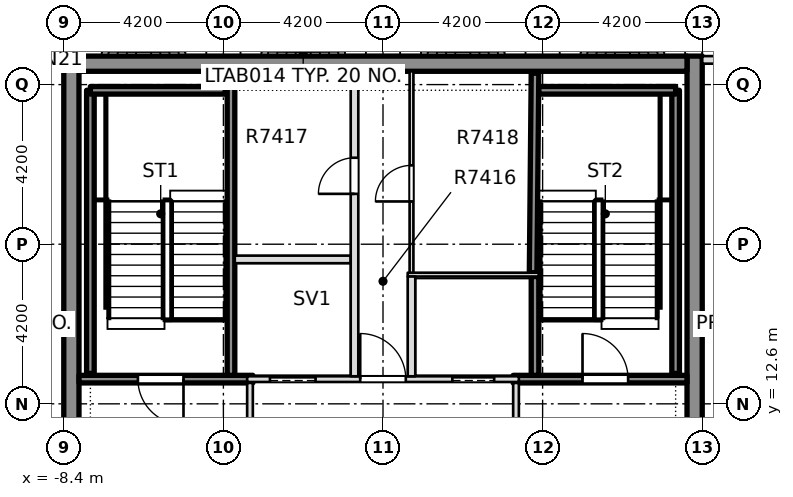
"""IFC4 building model, lengths in metres.
Left out: names, types, materials, properties, quantities, classifications, styles, units other than length and angle.
Written with IfcOpenShell. Run it as: python <this file> out.ifc"""

import sys

from ifc_helpers import new_model, si_unit, direction, frame, frame_2d, origin, place, context, subcontext, project, spatial, rectangle, extrude, element, fill, save


model = new_model("IFC4")
c1 = context("Model", 3, precision=1e-05, world=origin(), true_north=direction((0.0, 1.0)))
c2 = subcontext(c1, "Body", "Model", "MODEL_VIEW")
j1 = project(units=[si_unit("LENGTHUNIT", "METRE"), si_unit("PLANEANGLEUNIT", "RADIAN")], contexts=[c1])
p1 = place(None, origin())
s1 = spatial("IfcSite", under=j1, at=p1, CompositionType="ELEMENT")
p2 = place(p1, origin())
s2 = spatial("IfcBuilding", under=s1, at=p2, CompositionType="ELEMENT")
p3 = place(p2, frame((0.0, 0.0, 284.85)))
s3 = spatial("IfcBuildingStorey", under=s2, at=p3, CompositionType="ELEMENT", Elevation=284.85)
p4 = place(p3, frame((8.2, 4.2, -0.5), z_axis=(0.0, 0.0, 1.0), x_axis=(0.0, 1.0, 0.0)))
e1 = element("IfcWall", 1, at=p4, inside=s3, PredefinedType="SHEAR", context=c2, shape_type="SweptSolid", body=[
    extrude(rectangle(XDim=17.55, YDim=0.4, at=frame_2d((8.775, 0.0))), origin(), (0.0, 0.0, 1.0), 4.5),
])
p5 = place(p4, frame((6.7, 0.0, 0.5)))
e2 = element("IfcOpeningElement", 2, at=p5, cuts=e1, PredefinedType="OPENING", context=c2, shape_type="SweptSolid", body=[
    extrude(rectangle(XDim=1.2, YDim=2.1, at=frame_2d((0.6, 1.05))), frame((0.0, 0.21, 0.0), z_axis=(0.0, -1.0, 0.0), x_axis=(1.0, 0.0, 0.0)), (0.0, 0.0, 1.0), 0.42),
])
p6 = place(p3, frame((-8.2, 4.2, -0.5), z_axis=(0.0, 0.0, 1.0), x_axis=(0.0, 1.0, 0.0)))
e3 = element("IfcWall", 3, at=p6, inside=s3, PredefinedType="SHEAR", context=c2, shape_type="SweptSolid", body=[
    extrude(rectangle(XDim=17.55, YDim=0.4, at=frame_2d((8.775, 0.0))), origin(), (0.0, 0.0, 1.0), 4.5),
])
p7 = place(p6, frame((6.7, 0.0, 0.5)))
e4 = element("IfcOpeningElement", 4, at=p7, cuts=e3, PredefinedType="OPENING", context=c2, shape_type="SweptSolid", body=[
    extrude(rectangle(XDim=1.2, YDim=2.1, at=frame_2d((0.6, 1.05))), frame((0.0, 0.21, 0.0), z_axis=(0.0, -1.0, 0.0), x_axis=(1.0, 0.0, 0.0)), (0.0, 0.0, 1.0), 0.42),
])
p8 = place(p3, frame((-8.0, 21.55, -0.5), z_axis=(0.0, 0.0, 1.0), x_axis=(1.0, 0.0, 0.0)))
e5 = element("IfcWall", 5, at=p8, inside=s3, PredefinedType="SHEAR", context=c2, shape_type="SweptSolid", body=[
    extrude(rectangle(XDim=16.0, YDim=0.4, at=frame_2d((8.0, 0.0))), origin(), (0.0, 0.0, 1.0), 4.5),
])
for number, where, z_axis, x_axis in (
    (6, (9.6, 21.65, 0.0), (0.0, 0.0, 1.0), (-1.0, 0.0, 0.0)),
    (7, (-8.4, 21.65, 0.0), (0.0, 0.0, 1.0), (-1.0, 0.0, 0.0)),
):
    element("IfcWall", number, at=place(p3, frame(where, z_axis=z_axis, x_axis=x_axis)), inside=s3, PredefinedType="STANDARD", context=c2, shape_type="SweptSolid", body=[
        extrude(rectangle(XDim=1.2, YDim=0.2, at=frame_2d((0.6, 0.0))), origin(), (0.0, 0.0, 1.0), 4.0),
    ])
p9 = place(p3, frame((-7.999, 13.25, 0.0), z_axis=(0.0, 0.0, 1.0), x_axis=(1.0, 0.0, 0.0)))
e8 = element("IfcWall", 8, at=p9, inside=s3, PredefinedType="SOLIDWALL", context=c2, shape_type="SweptSolid", body=[
    extrude(rectangle(XDim=4.574, YDim=0.2, at=frame_2d((2.287, 0.0))), origin(), (0.0, 0.0, 1.0), 4.0),
])
p10 = place(p9, frame((1.549, 0.0, 0.0)))
e9 = element("IfcOpeningElement", 9, at=p10, cuts=e8, PredefinedType="OPENING", context=c2, shape_type="SweptSolid", body=[
    extrude(rectangle(XDim=1.2, YDim=2.1, at=frame_2d((0.6, 1.05))), frame((0.0, 0.11, 0.0), z_axis=(0.0, -1.0, 0.0), x_axis=(1.0, 0.0, 0.0)), (0.0, 0.0, 1.0), 0.22),
])
p11 = place(p3, frame((-3.575, 13.25, 0.0), z_axis=(0.0, 0.0, 1.0), x_axis=(1.0, 0.0, 0.0)))
e10 = element("IfcWall", 10, at=p11, inside=s3, PredefinedType="PARTITIONING", context=c2, shape_type="SweptSolid", body=[
    extrude(rectangle(XDim=7.15, YDim=0.15, at=frame_2d((3.575, 0.0))), origin(), (0.0, 0.0, 1.0), 4.0),
])
p12 = place(p11, frame((0.6, 0.0, 0.0)))
e11 = element("IfcOpeningElement", 11, at=p12, cuts=e10, PredefinedType="OPENING", context=c2, shape_type="SweptSolid", body=[
    extrude(rectangle(XDim=1.2, YDim=2.1, at=frame_2d((0.6, 1.05))), frame((0.0, 0.085, 0.0), z_axis=(0.0, -1.0, 0.0), x_axis=(1.0, 0.0, 0.0)), (0.0, 0.0, 1.0), 0.17),
])
p13 = place(p11, frame((5.4, 0.0, 0.0)))
e12 = element("IfcOpeningElement", 12, at=p13, cuts=e10, PredefinedType="OPENING", context=c2, shape_type="SweptSolid", body=[
    extrude(rectangle(XDim=1.1, YDim=2.1, at=frame_2d((0.55, 1.05))), frame((0.0, 0.085, 0.0), z_axis=(0.0, -1.0, 0.0), x_axis=(1.0, 0.0, 0.0)), (0.0, 0.0, 1.0), 0.17),
])
p14 = place(p11, frame((2.975, 0.0, 0.0)))
e13 = element("IfcOpeningElement", 13, at=p14, cuts=e10, PredefinedType="OPENING", context=c2, shape_type="SweptSolid", body=[
    extrude(rectangle(XDim=1.2, YDim=2.1, at=frame_2d((0.6, 1.05))), frame((0.0, 0.085, 0.0), z_axis=(0.0, -1.0, 0.0), x_axis=(1.0, 0.0, 0.0)), (0.0, 0.0, 1.0), 0.17),
])
p15 = place(p3, frame((3.425, 13.25, 0.0), z_axis=(0.0, 0.0, 1.0), x_axis=(1.0, 0.0, 0.0)))
e14 = element("IfcWall", 14, at=p15, inside=s3, PredefinedType="SOLIDWALL", context=c2, shape_type="SweptSolid", body=[
    extrude(rectangle(XDim=4.574, YDim=0.2, at=frame_2d((2.287, 0.0))), origin(), (0.0, 0.0, 1.0), 4.0),
])
p16 = place(p15, frame((1.825, 0.0, 0.0)))
e15 = element("IfcOpeningElement", 15, at=p16, cuts=e14, PredefinedType="OPENING", context=c2, shape_type="SweptSolid", body=[
    extrude(rectangle(XDim=1.2, YDim=2.1, at=frame_2d((0.6, 1.05))), frame((0.0, 0.11, 0.0), z_axis=(0.0, -1.0, 0.0), x_axis=(1.0, 0.0, 0.0)), (0.0, 0.0, 1.0), 0.22),
])
p17 = place(p3, frame((0.65, 16.0, 0.0), z_axis=(0.0, 0.0, 1.0), x_axis=(1.0, 0.0, 0.0)))
e16 = element("IfcWall", 16, at=p17, inside=s3, PredefinedType="PARTITIONING", context=c2, shape_type="SweptSolid", body=[
    extrude(rectangle(XDim=3.45, YDim=0.1, at=frame_2d((1.725, 0.0))), origin(), (0.0, 0.0, 1.0), 4.0),
])
p18 = place(p3, frame((-3.9, 16.4, 0.0), z_axis=(0.0, 0.0, 1.0), x_axis=(1.0, 0.0, 0.0)))
e17 = element("IfcWall", 17, at=p18, inside=s3, PredefinedType="PARTITIONING", context=c2, shape_type="SweptSolid", body=[
    extrude(rectangle(XDim=3.05, YDim=0.2, at=frame_2d((1.525, 0.0))), origin(), (0.0, 0.0, 1.0), 4.0),
])
p19 = place(p3, frame((-4.0, 13.35, 0.0), z_axis=(0.0, 0.0, 1.0), x_axis=(0.0, 1.0, 0.0)))
e18 = element("IfcWall", 18, at=p19, inside=s3, PredefinedType="SOLIDWALL", context=c2, shape_type="SweptSolid", body=[
    extrude(rectangle(XDim=7.999, YDim=0.2, at=frame_2d((4.0, 0.0))), origin(), (0.0, 0.0, 1.0), 4.0),
])
p20 = place(p3, frame((-3.5, 10.075, 0.0), z_axis=(0.0, 0.0, 1.0), x_axis=(0.0, 1.0, 0.0)))
e19 = element("IfcWall", 19, at=p20, inside=s3, PredefinedType="PARTITIONING", context=c2, shape_type="SweptSolid", body=[
    extrude(rectangle(XDim=3.075, YDim=0.15, at=frame_2d((1.538, 0.0))), origin(), (0.0, 0.0, 1.0), 4.0),
])
p21 = place(p20, frame((0.925, 0.0, 0.0)))
e20 = element("IfcOpeningElement", 20, at=p21, cuts=e19, PredefinedType="OPENING", context=c2, shape_type="SweptSolid", body=[
    extrude(rectangle(XDim=1.2, YDim=2.1, at=frame_2d((0.6, 1.05))), frame((0.0, 0.085, 0.0), z_axis=(0.0, -1.0, 0.0), x_axis=(1.0, 0.0, 0.0)), (0.0, 0.0, 1.0), 0.17),
])
p22 = place(p3, frame((-0.75, 13.325, 0.0), z_axis=(0.0, 0.0, 1.0), x_axis=(0.0, 1.0, 0.0)))
e21 = element("IfcWall", 21, at=p22, inside=s3, PredefinedType="PARTITIONING", context=c2, shape_type="SweptSolid", body=[
    extrude(rectangle(XDim=8.024, YDim=0.2, at=frame_2d((4.012, 0.0))), origin(), (0.0, 0.0, 1.0), 4.0),
])
p23 = place(p22, frame((4.8, 0.0, 0.0)))
e22 = element("IfcOpeningElement", 22, at=p23, cuts=e21, PredefinedType="OPENING", context=c2, shape_type="SweptSolid", body=[
    extrude(rectangle(XDim=0.95, YDim=2.1, at=frame_2d((0.475, 1.05))), frame((0.0, 0.11, 0.0), z_axis=(0.0, -1.0, 0.0), x_axis=(1.0, 0.0, 0.0)), (0.0, 0.0, 1.0), 0.22),
])
p24 = place(p3, frame((0.75, 13.325, 0.0), z_axis=(0.0, 0.0, 1.0), x_axis=(0.0, 1.0, 0.0)))
e23 = element("IfcWall", 23, at=p24, inside=s3, PredefinedType="PARTITIONING", context=c2, shape_type="SweptSolid", body=[
    extrude(rectangle(XDim=2.625, YDim=0.2, at=frame_2d((1.312, 0.0))), origin(), (0.0, 0.0, 1.0), 4.0),
])
p25 = place(p3, frame((0.75, 16.05, 0.0), z_axis=(0.0, 0.0, 1.0), x_axis=(0.0, 1.0, 0.0)))
e24 = element("IfcWall", 24, at=p25, inside=s3, PredefinedType="PARTITIONING", context=c2, shape_type="SweptSolid", body=[
    extrude(rectangle(XDim=5.299, YDim=0.1, at=frame_2d((2.649, 0.0))), origin(), (0.0, 0.0, 1.0), 4.0),
])
p26 = place(p25, frame((1.875, 0.0, 0.0)))
e25 = element("IfcOpeningElement", 25, at=p26, cuts=e24, PredefinedType="OPENING", context=c2, shape_type="SweptSolid", body=[
    extrude(rectangle(XDim=0.95, YDim=2.1, at=frame_2d((0.475, 1.05))), frame((0.0, 0.06, 0.0), z_axis=(0.0, -1.0, 0.0), x_axis=(1.0, 0.0, 0.0)), (0.0, 0.0, 1.0), 0.12),
])
p27 = place(p3, frame((3.5, 10.075, 0.0), z_axis=(0.0, 0.0, 1.0), x_axis=(0.0, 1.0, 0.0)))
e26 = element("IfcWall", 26, at=p27, inside=s3, PredefinedType="PARTITIONING", context=c2, shape_type="SweptSolid", body=[
    extrude(rectangle(XDim=3.075, YDim=0.15, at=frame_2d((1.538, 0.0))), origin(), (0.0, 0.0, 1.0), 4.0),
])
p28 = place(p27, frame((0.925, 0.0, 0.0)))
e27 = element("IfcOpeningElement", 27, at=p28, cuts=e26, PredefinedType="OPENING", context=c2, shape_type="SweptSolid", body=[
    extrude(rectangle(XDim=1.2, YDim=2.1, at=frame_2d((0.6, 1.05))), frame((0.0, 0.085, 0.0), z_axis=(0.0, -1.0, 0.0), x_axis=(1.0, 0.0, 0.0)), (0.0, 0.0, 1.0), 0.17),
])
p29 = place(p3, frame((4.0, 13.35, 0.0), z_axis=(0.0, 0.0, 1.0), x_axis=(0.0, 1.0, 0.0)))
e28 = element("IfcWall", 28, at=p29, inside=s3, PredefinedType="SOLIDWALL", context=c2, shape_type="SweptSolid", body=[
    extrude(rectangle(XDim=2.6, YDim=0.2, at=frame_2d((1.3, 0.0))), origin(), (0.0, 0.0, 1.0), 4.0),
])
p30 = place(p3, frame((3.95, 16.05, 0.0), z_axis=(0.0, 0.0, 1.0), x_axis=(0.009534450323, 0.999954546095, 0.0)))
e29 = element("IfcWall", 29, at=p30, inside=s3, PredefinedType="SOLIDWALL", context=c2, shape_type="SweptSolid", body=[
    extrude(rectangle(XDim=5.249, YDim=0.2, at=frame_2d((2.625, 0.0))), origin(), (0.0, 0.0, 1.0), 4.0),
])
p31 = place(p3, frame((-7.7, 13.4, 0.0), z_axis=(0.0, 0.0, 1.0), x_axis=(0.0, 1.0, 0.0)))
e30 = element("IfcWall", 30, at=p31, inside=s3, PredefinedType="SOLIDWALL", context=c2, shape_type="SweptSolid", body=[
    extrude(rectangle(XDim=7.45, YDim=0.2, at=frame_2d((3.725, 0.0))), origin(), (0.0, 0.0, 1.0), 4.0),
])
p32 = place(p3, frame((-7.7, 20.85, 0.0), z_axis=(0.0, 0.0, 1.0), x_axis=(1.0, 0.0, 0.0)))
e31 = element("IfcWall", 31, at=p32, inside=s3, PredefinedType="SOLIDWALL", context=c2, shape_type="SweptSolid", body=[
    extrude(rectangle(XDim=3.55, YDim=0.2, at=frame_2d((1.775, 0.0))), origin(), (0.0, 0.0, 1.0), 4.0),
])
p33 = place(p3, frame((7.7, 13.4, 0.0), z_axis=(0.0, 0.0, 1.0), x_axis=(0.0, 1.0, 0.0)))
e32 = element("IfcWall", 32, at=p33, inside=s3, PredefinedType="SOLIDWALL", context=c2, shape_type="SweptSolid", body=[
    extrude(rectangle(XDim=7.45, YDim=0.2, at=frame_2d((3.725, 0.0))), origin(), (0.0, 0.0, 1.0), 4.0),
])
p34 = place(p3, frame((4.1, 20.85, 0.0), z_axis=(0.0, 0.0, 1.0), x_axis=(1.0, 0.0, 0.0)))
e33 = element("IfcWall", 33, at=p34, inside=s3, PredefinedType="SOLIDWALL", context=c2, shape_type="SweptSolid", body=[
    extrude(rectangle(XDim=3.6, YDim=0.2, at=frame_2d((1.8, 0.0))), origin(), (0.0, 0.0, 1.0), 4.0),
])
p35 = place(p10, origin())
e34 = element("IfcDoor", 34, at=p35, inside=s3, OperationType="SINGLE_SWING_LEFT", PredefinedType="DOOR", context=c2, shape_type="SweptSolid", body=[
    extrude(rectangle(XDim=1.2, YDim=2.1, at=frame_2d((0.6, 1.05))), frame((0.0, 0.025, 0.0), z_axis=(0.0, -1.0, 0.0), x_axis=(1.0, 0.0, 0.0)), (0.0, 0.0, 1.0), 0.05),
])
fill(e9, e34)
p36 = place(p16, origin())
e35 = element("IfcDoor", 35, at=p36, inside=s3, OperationType="SINGLE_SWING_RIGHT", PredefinedType="DOOR", context=c2, shape_type="SweptSolid", body=[
    extrude(rectangle(XDim=1.2, YDim=2.1, at=frame_2d((0.6, 1.05))), frame((0.0, 0.025, 0.0), z_axis=(0.0, -1.0, 0.0), x_axis=(1.0, 0.0, 0.0)), (0.0, 0.0, 1.0), 0.05),
])
fill(e15, e35)
p37 = place(p12, origin())
e36 = element("IfcDoor", 36, at=p37, inside=s3, OperationType="SLIDING_TO_RIGHT", PredefinedType="DOOR", context=c2, shape_type="SweptSolid", body=[
    extrude(rectangle(XDim=1.2, YDim=2.1, at=frame_2d((0.6, 1.05))), frame((0.0, 0.025, 0.0), z_axis=(0.0, -1.0, 0.0), x_axis=(1.0, 0.0, 0.0)), (0.0, 0.0, 1.0), 0.05),
])
fill(e11, e36)
p38 = place(p13, origin())
e37 = element("IfcDoor", 37, at=p38, inside=s3, OperationType="SLIDING_TO_LEFT", PredefinedType="DOOR", context=c2, shape_type="SweptSolid", body=[
    extrude(rectangle(XDim=1.1, YDim=2.1, at=frame_2d((0.55, 1.05))), frame((0.0, 0.025, 0.0), z_axis=(0.0, -1.0, 0.0), x_axis=(1.0, 0.0, 0.0)), (0.0, 0.0, 1.0), 0.05),
])
fill(e12, e37)
p39 = place(p14, origin())
e38 = element("IfcDoor", 38, at=p39, inside=s3, OperationType="SINGLE_SWING_RIGHT", PredefinedType="DOOR", context=c2, shape_type="SweptSolid", body=[
    extrude(rectangle(XDim=1.2, YDim=2.1, at=frame_2d((0.6, 1.05))), frame((0.0, 0.025, 0.0), z_axis=(0.0, -1.0, 0.0), x_axis=(1.0, 0.0, 0.0)), (0.0, 0.0, 1.0), 0.05),
])
fill(e13, e38)
p40 = place(p23, origin())
e39 = element("IfcDoor", 39, at=p40, inside=s3, OperationType="SINGLE_SWING_RIGHT", PredefinedType="DOOR", context=c2, shape_type="SweptSolid", body=[
    extrude(rectangle(XDim=0.95, YDim=2.1, at=frame_2d((0.475, 1.05))), frame((0.0, 0.025, 0.0), z_axis=(0.0, -1.0, 0.0), x_axis=(1.0, 0.0, 0.0)), (0.0, 0.0, 1.0), 0.05),
])
fill(e22, e39)
p41 = place(p26, origin())
e40 = element("IfcDoor", 40, at=p41, inside=s3, OperationType="SINGLE_SWING_LEFT", PredefinedType="DOOR", context=c2, shape_type="SweptSolid", body=[
    extrude(rectangle(XDim=0.95, YDim=2.1, at=frame_2d((0.475, 1.05))), frame((0.0, 0.025, 0.0), z_axis=(0.0, -1.0, 0.0), x_axis=(1.0, 0.0, 0.0)), (0.0, 0.0, 1.0), 0.05),
])
fill(e25, e40)
save(model, sys.argv[1])
